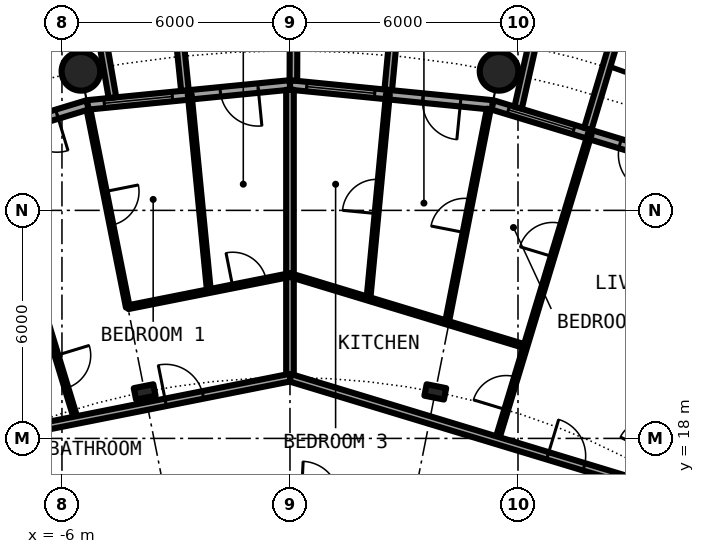
"""IFC4 building model, lengths in metres.
Left out: names, types, materials, properties, quantities, classifications, styles, units other than length and angle.
Written with IfcOpenShell. Run it as: python <this file> out.ifc"""

import sys

from ifc_helpers import new_model, si_unit, direction, frame, frame_2d, origin, origin_2d, place, context, subcontext, project, spatial, rectangle, hollow_circle, i_section, extrude, element, fill, save


model = new_model("IFC4")
c1 = context("Model", 3, precision=1e-05, world=origin(), true_north=direction((0.0, 1.0)))
c2 = subcontext(c1, "Body", "Model", "MODEL_VIEW")
j1 = project(units=[si_unit("LENGTHUNIT", "METRE"), si_unit("PLANEANGLEUNIT", "RADIAN")], contexts=[c1])
p1 = place(None, origin())
s1 = spatial("IfcSite", under=j1, at=p1, CompositionType="ELEMENT")
p2 = place(p1, origin())
s2 = spatial("IfcBuilding", under=s1, at=p2, CompositionType="ELEMENT")
p3 = place(p2, frame((0.0, 0.0, 88.0)))
s3 = spatial("IfcBuildingStorey", under=s2, at=p3, CompositionType="ELEMENT", Elevation=88.0)
for number, where, z_axis, x_axis in (
    (1, (5.501, 27.658, 0.0), (0.0, 0.0, 1.0), (1.0, 0.0, 0.0)),
    (2, (-5.501, 27.658, 0.0), (0.0, 0.0, 1.0), (1.0, 0.0, 0.0)),
):
    element("IfcColumn", number, at=place(p3, frame(where, z_axis=z_axis, x_axis=x_axis)), inside=s3, PredefinedType="COLUMN", context=c2, shape_type="SweptSolid", body=[
        extrude(hollow_circle(Radius=0.508, WallThickness=0.04, at=origin_2d()), origin(), (0.0, 0.0, 1.0), 3.05),
    ])
for number, where, z_axis, x_axis in (
    (3, (3.824, 19.223, 0.0), (0.0, 0.0, 1.0), (0.195, 0.981, 0.0)),
    (4, (-3.824, 19.223, 0.0), (0.0, 0.0, 1.0), (-0.195, 0.981, 0.0)),
):
    element("IfcColumn", number, at=place(p3, frame(where, z_axis=z_axis, x_axis=x_axis)), inside=s3, PredefinedType="COLUMN", context=c2, shape_type="SweptSolid", body=[
        extrude(i_section(OverallWidth=0.306, OverallDepth=0.524, WebThickness=0.021, FlangeThickness=0.04, FilletRadius=0.027, at=origin_2d()), origin(), (0.0, 0.0, 1.0), 3.05),
    ])
p4 = place(p3, frame((10.447, 25.222, 0.0), z_axis=(0.0, 0.0, 1.0), x_axis=(-0.956965678721, 0.290201119486, 0.0)))
e5 = element("IfcWall", 5, at=p4, inside=s3, PredefinedType="SOLIDWALL", context=c2, shape_type="SweptSolid", body=[
    extrude(rectangle(XDim=5.351, YDim=0.25, at=frame_2d((2.676, 0.0))), origin(), (0.0, 0.0, 1.0), 2.7),
])
p5 = place(p4, frame((0.841, 0.0, 0.0)))
e6 = element("IfcOpeningElement", 6, at=p5, cuts=e5, PredefinedType="OPENING", context=c2, shape_type="SweptSolid", body=[
    extrude(rectangle(XDim=1.0, YDim=2.2, at=frame_2d((0.5, 1.1))), frame((0.0, 0.135, 0.0), z_axis=(0.0, -1.0, 0.0), x_axis=(1.0, 0.0, 0.0)), (0.0, 0.0, 1.0), 0.27),
])
p6 = place(p4, frame((3.111, 0.0, 0.3)))
e7 = element("IfcOpeningElement", 7, at=p6, cuts=e5, PredefinedType="OPENING", context=c2, shape_type="SweptSolid", body=[
    extrude(rectangle(XDim=1.8, YDim=2.1, at=frame_2d((0.9, 1.05))), frame((0.0, 0.135, 0.0), z_axis=(0.0, -1.0, 0.0), x_axis=(1.0, 0.0, 0.0)), (0.0, 0.0, 1.0), 0.27),
])
p7 = place(p3, frame((7.837, 26.144, -0.03), z_axis=(0.0, 0.0, 1.0), x_axis=(0.287064767992, 0.957911174889, 0.0)))
e8 = element("IfcWall", 8, at=p7, inside=s3, PredefinedType="SOLIDWALL", context=c2, shape_type="SweptSolid", body=[
    extrude(rectangle(XDim=3.006, YDim=0.2, at=frame_2d((1.503, 0.0))), origin(), (0.0, 0.0, 1.0), 2.73),
])
p8 = place(p3, frame((6.004, 26.7, -0.03), z_axis=(0.0, 0.0, 1.0), x_axis=(0.219609259383, 0.975587911566, 0.0)))
e9 = element("IfcWall", 9, at=p8, inside=s3, PredefinedType="SOLIDWALL", context=c2, shape_type="SweptSolid", body=[
    extrude(rectangle(XDim=2.933, YDim=0.2, at=frame_2d((1.466, 0.0))), origin(), (0.0, 0.0, 1.0), 2.73),
])
p9 = place(p3, frame((5.326, 26.775, 0.0), z_axis=(0.0, 0.0, 1.0), x_axis=(-0.995173996315, 0.098126026407, 0.0)))
e10 = element("IfcWall", 10, at=p9, inside=s3, PredefinedType="SOLIDWALL", context=c2, shape_type="SweptSolid", body=[
    extrude(rectangle(XDim=5.352, YDim=0.25, at=frame_2d((2.676, 0.0))), origin(), (0.0, 0.0, 1.0), 2.7),
])
p10 = place(p9, frame((0.841, 0.0, 0.0)))
e11 = element("IfcOpeningElement", 11, at=p10, cuts=e10, PredefinedType="OPENING", context=c2, shape_type="SweptSolid", body=[
    extrude(rectangle(XDim=1.0, YDim=2.2, at=frame_2d((0.5, 1.1))), frame((0.0, 0.135, 0.0), z_axis=(0.0, -1.0, 0.0), x_axis=(1.0, 0.0, 0.0)), (0.0, 0.0, 1.0), 0.27),
])
p11 = place(p9, frame((3.111, 0.0, 0.3)))
e12 = element("IfcOpeningElement", 12, at=p11, cuts=e10, PredefinedType="OPENING", context=c2, shape_type="SweptSolid", body=[
    extrude(rectangle(XDim=1.8, YDim=2.1, at=frame_2d((0.9, 1.05))), frame((0.0, 0.135, 0.0), z_axis=(0.0, -1.0, 0.0), x_axis=(1.0, 0.0, 0.0)), (0.0, 0.0, 1.0), 0.27),
])
p12 = place(p3, frame((2.586, 27.171, -0.03), z_axis=(0.0, 0.0, 1.0), x_axis=(0.094548432284, 0.995520262954, 0.0)))
e13 = element("IfcWall", 13, at=p12, inside=s3, PredefinedType="SOLIDWALL", context=c2, shape_type="SweptSolid", body=[
    extrude(rectangle(XDim=3.006, YDim=0.2, at=frame_2d((1.503, 0.0))), origin(), (0.0, 0.0, 1.0), 2.73),
])
p13 = place(p3, frame((0.09, 27.417, -0.03), z_axis=(0.0, 0.0, 1.0), x_axis=(0.00347308367, 0.999993968827, 0.0)))
e14 = element("IfcWall", 14, at=p13, inside=s3, PredefinedType="SOLIDWALL", context=c2, shape_type="SweptSolid", body=[
    extrude(rectangle(XDim=2.882, YDim=0.2, at=frame_2d((1.441, 0.0))), origin(), (0.0, 0.0, 1.0), 2.73),
])
p14 = place(p3, frame((0.0, 27.3, 0.0), z_axis=(0.0, 0.0, 1.0), x_axis=(-0.995173996315, -0.098126026407, 0.0)))
e15 = element("IfcWall", 15, at=p14, inside=s3, PredefinedType="SOLIDWALL", context=c2, shape_type="SweptSolid", body=[
    extrude(rectangle(XDim=5.352, YDim=0.25, at=frame_2d((2.676, 0.0))), origin(), (0.0, 0.0, 1.0), 2.7),
])
p15 = place(p14, frame((0.841, 0.0, 0.0)))
e16 = element("IfcOpeningElement", 16, at=p15, cuts=e15, PredefinedType="OPENING", context=c2, shape_type="SweptSolid", body=[
    extrude(rectangle(XDim=1.0, YDim=2.2, at=frame_2d((0.5, 1.1))), frame((0.0, 0.135, 0.0), z_axis=(0.0, -1.0, 0.0), x_axis=(1.0, 0.0, 0.0)), (0.0, 0.0, 1.0), 0.27),
])
p16 = place(p14, frame((3.111, 0.0, 0.3)))
e17 = element("IfcOpeningElement", 17, at=p16, cuts=e15, PredefinedType="OPENING", context=c2, shape_type="SweptSolid", body=[
    extrude(rectangle(XDim=1.8, YDim=2.1, at=frame_2d((0.9, 1.05))), frame((0.0, 0.135, 0.0), z_axis=(0.0, -1.0, 0.0), x_axis=(1.0, 0.0, 0.0)), (0.0, 0.0, 1.0), 0.27),
])
p17 = place(p3, frame((-2.764, 27.153, -0.03), z_axis=(0.0, 0.0, 1.0), x_axis=(-0.101505487237, 0.994834979311, 0.0)))
e18 = element("IfcWall", 18, at=p17, inside=s3, PredefinedType="SOLIDWALL", context=c2, shape_type="SweptSolid", body=[
    extrude(rectangle(XDim=3.007, YDim=0.2, at=frame_2d((1.503, 0.0))), origin(), (0.0, 0.0, 1.0), 2.73),
])
p18 = place(p3, frame((-4.671, 26.966, -0.03), z_axis=(0.0, 0.0, 1.0), x_axis=(-0.170539878907, 0.985350774954, 0.0)))
e19 = element("IfcWall", 19, at=p18, inside=s3, PredefinedType="SOLIDWALL", context=c2, shape_type="SweptSolid", body=[
    extrude(rectangle(XDim=2.932, YDim=0.2, at=frame_2d((1.466, 0.0))), origin(), (0.0, 0.0, 1.0), 2.73),
])
p19 = place(p3, frame((-5.326, 26.775, 0.0), z_axis=(0.0, 0.0, 1.0), x_axis=(-0.956965678721, -0.290201119486, 0.0)))
e20 = element("IfcWall", 20, at=p19, inside=s3, PredefinedType="SOLIDWALL", context=c2, shape_type="SweptSolid", body=[
    extrude(rectangle(XDim=5.351, YDim=0.25, at=frame_2d((2.676, 0.0))), origin(), (0.0, 0.0, 1.0), 2.7),
])
p20 = place(p19, frame((0.841, 0.0, 0.0)))
e21 = element("IfcOpeningElement", 21, at=p20, cuts=e20, PredefinedType="OPENING", context=c2, shape_type="SweptSolid", body=[
    extrude(rectangle(XDim=1.0, YDim=2.2, at=frame_2d((0.5, 1.1))), frame((0.0, 0.135, 0.0), z_axis=(0.0, -1.0, 0.0), x_axis=(1.0, 0.0, 0.0)), (0.0, 0.0, 1.0), 0.27),
])
p21 = place(p19, frame((3.111, 0.0, 0.3)))
e22 = element("IfcOpeningElement", 22, at=p21, cuts=e20, PredefinedType="OPENING", context=c2, shape_type="SweptSolid", body=[
    extrude(rectangle(XDim=1.8, YDim=2.1, at=frame_2d((0.9, 1.05))), frame((0.0, 0.135, 0.0), z_axis=(0.0, -1.0, 0.0), x_axis=(1.0, 0.0, 0.0)), (0.0, 0.0, 1.0), 0.27),
])
p22 = place(p3, frame((-6.4, 21.027, 0.0), z_axis=(0.0, 0.0, 1.0), x_axis=(0.291157965538, -0.956674991365, 0.0)))
e23 = element("IfcWall", 23, at=p22, inside=s3, PredefinedType="PARTITIONING", context=c2, shape_type="SweptSolid", body=[
    extrude(rectangle(XDim=2.661, YDim=0.1, at=frame_2d((1.331, 0.0))), origin(), (0.0, 0.0, 1.0), 2.7),
])
p23 = place(p22, frame((0.881, 0.0, 0.0)))
e24 = element("IfcOpeningElement", 24, at=p23, cuts=e23, PredefinedType="OPENING", context=c2, shape_type="SweptSolid", body=[
    extrude(rectangle(XDim=0.9, YDim=2.3, at=frame_2d((0.45, 1.15))), frame((0.0, 0.06, 0.0), z_axis=(0.0, -1.0, 0.0), x_axis=(1.0, 0.0, 0.0)), (0.0, 0.0, 1.0), 0.12),
])
p24 = place(p3, frame((-5.302, 26.653, 0.0), z_axis=(0.0, 0.0, 1.0), x_axis=(0.195115793364, -0.980780213493, 0.0)))
e25 = element("IfcWall", 25, at=p24, inside=s3, PredefinedType="PARTITIONING", context=c2, shape_type="SweptSolid", body=[
    extrude(rectangle(XDim=5.304, YDim=0.1, at=frame_2d((2.652, 0.0))), origin(), (0.0, 0.0, 1.0), 2.7),
])
p25 = place(p24, frame((2.202, 0.0, 0.0)))
e26 = element("IfcOpeningElement", 26, at=p25, cuts=e25, PredefinedType="OPENING", context=c2, shape_type="SweptSolid", body=[
    extrude(rectangle(XDim=0.9, YDim=2.3, at=frame_2d((0.45, 1.15))), frame((0.0, 0.06, 0.0), z_axis=(0.0, -1.0, 0.0), x_axis=(1.0, 0.0, 0.0)), (0.0, 0.0, 1.0), 0.12),
])
p26 = place(p3, frame((-2.638, 27.047, 0.0), z_axis=(0.0, 0.0, 1.0), x_axis=(0.097172620677, -0.99526754282, 0.0)))
e27 = element("IfcWall", 27, at=p26, inside=s3, PredefinedType="PARTITIONING", context=c2, shape_type="SweptSolid", body=[
    extrude(rectangle(XDim=5.196, YDim=0.1, at=frame_2d((2.598, 0.0))), origin(), (0.0, 0.0, 1.0), 2.7),
])
p27 = place(p3, frame((0.0, 19.6, 0.0), z_axis=(0.0, 0.0, 1.0), x_axis=(0.0, 1.0, 0.0)))
e28 = element("IfcWall", 28, at=p27, inside=s3, PredefinedType="PARTITIONING", context=c2, shape_type="SweptSolid", body=[
    extrude(rectangle(XDim=7.575, YDim=0.2, at=frame_2d((3.788, 0.0))), origin(), (0.0, 0.0, 1.0), 2.7),
])
p28 = place(p3, frame((2.065, 21.674, 0.0), z_axis=(0.0, 0.0, 1.0), x_axis=(0.094751520537, 0.99550095397, 0.0)))
e29 = element("IfcWall", 29, at=p28, inside=s3, PredefinedType="PARTITIONING", context=c2, shape_type="SweptSolid", body=[
    extrude(rectangle(XDim=5.403, YDim=0.1, at=frame_2d((2.702, 0.0))), origin(), (0.0, 0.0, 1.0), 2.7),
])
p29 = place(p28, frame((2.252, 0.0, 0.0)))
e30 = element("IfcOpeningElement", 30, at=p29, cuts=e29, PredefinedType="OPENING", context=c2, shape_type="SweptSolid", body=[
    extrude(rectangle(XDim=0.9, YDim=2.3, at=frame_2d((0.45, 1.15))), frame((0.0, 0.06, 0.0), z_axis=(0.0, -1.0, 0.0), x_axis=(1.0, 0.0, 0.0)), (0.0, 0.0, 1.0), 0.12),
])
p30 = place(p3, frame((4.13, 21.047, 0.0), z_axis=(0.0, 0.0, 1.0), x_axis=(0.192433779325, 0.981309961518, 0.0)))
e31 = element("IfcWall", 31, at=p30, inside=s3, PredefinedType="PARTITIONING", context=c2, shape_type="SweptSolid", body=[
    extrude(rectangle(XDim=5.727, YDim=0.1, at=frame_2d((2.863, 0.0))), origin(), (0.0, 0.0, 1.0), 2.7),
])
p31 = place(p30, frame((2.414, 0.0, 0.0)))
e32 = element("IfcOpeningElement", 32, at=p31, cuts=e31, PredefinedType="OPENING", context=c2, shape_type="SweptSolid", body=[
    extrude(rectangle(XDim=0.9, YDim=2.3, at=frame_2d((0.45, 1.15))), frame((0.0, 0.06, 0.0), z_axis=(0.0, -1.0, 0.0), x_axis=(1.0, 0.0, 0.0)), (0.0, 0.0, 1.0), 0.12),
])
p32 = place(p3, frame((5.445, 17.948, 0.0), z_axis=(0.0, 0.0, 1.0), x_axis=(0.290158700753, 0.956978541231, 0.0)))
e33 = element("IfcWall", 33, at=p32, inside=s3, PredefinedType="PARTITIONING", context=c2, shape_type="SweptSolid", body=[
    extrude(rectangle(XDim=8.419, YDim=0.1, at=frame_2d((4.209, 0.0))), origin(), (0.0, 0.0, 1.0), 2.7),
])
p33 = place(p32, frame((0.842, 0.0, 0.0)))
e34 = element("IfcOpeningElement", 34, at=p33, cuts=e33, PredefinedType="OPENING", context=c2, shape_type="SweptSolid", body=[
    extrude(rectangle(XDim=0.9, YDim=2.3, at=frame_2d((0.45, 1.15))), frame((0.0, 0.06, 0.0), z_axis=(0.0, -1.0, 0.0), x_axis=(1.0, 0.0, 0.0)), (0.0, 0.0, 1.0), 0.12),
])
p34 = place(p32, frame((5.052, 0.0, 0.0)))
e35 = element("IfcOpeningElement", 35, at=p34, cuts=e33, PredefinedType="OPENING", context=c2, shape_type="SweptSolid", body=[
    extrude(rectangle(XDim=0.9, YDim=2.3, at=frame_2d((0.45, 1.15))), frame((0.0, 0.06, 0.0), z_axis=(0.0, -1.0, 0.0), x_axis=(1.0, 0.0, 0.0)), (0.0, 0.0, 1.0), 0.12),
])
p35 = place(p3, frame((-0.007, 19.599, 0.0), z_axis=(0.0, 0.0, 1.0), x_axis=(0.95700958731, -0.290056287291, 0.0)))
e36 = element("IfcWall", 36, at=p35, inside=s3, PredefinedType="PARTITIONING", context=c2, shape_type="SweptSolid", body=[
    extrude(rectangle(XDim=11.226, YDim=0.2, at=frame_2d((5.613, 0.0))), origin(), (0.0, 0.0, 1.0), 2.38),
])
p36 = place(p35, frame((7.093, 0.0, 0.0)))
e37 = element("IfcOpeningElement", 37, at=p36, cuts=e36, PredefinedType="OPENING", context=c2, shape_type="SweptSolid", body=[
    extrude(rectangle(XDim=1.0, YDim=2.3, at=frame_2d((0.5, 1.15))), frame((0.0, 0.11, 0.0), z_axis=(0.0, -1.0, 0.0), x_axis=(1.0, 0.0, 0.0)), (0.0, 0.0, 1.0), 0.22),
])
p37 = place(p3, frame((-7.501, 18.108, 0.0), z_axis=(0.0, 0.0, 1.0), x_axis=(0.980791233058, 0.195060393611, 0.0)))
e38 = element("IfcWall", 38, at=p37, inside=s3, PredefinedType="PARTITIONING", context=c2, shape_type="SweptSolid", body=[
    extrude(rectangle(XDim=7.65, YDim=0.2, at=frame_2d((3.825, 0.0))), origin(), (0.0, 0.0, 1.0), 2.38),
])
p38 = place(p37, frame((4.313, 0.0, 0.0)))
e39 = element("IfcOpeningElement", 39, at=p38, cuts=e38, PredefinedType="OPENING", context=c2, shape_type="SweptSolid", body=[
    extrude(rectangle(XDim=1.0, YDim=2.3, at=frame_2d((0.5, 1.15))), frame((0.0, 0.11, 0.0), z_axis=(0.0, -1.0, 0.0), x_axis=(1.0, 0.0, 0.0)), (0.0, 0.0, 1.0), 0.22),
])
p39 = place(p3, frame((-0.004, 22.299, 0.0), z_axis=(0.0, 0.0, 1.0), x_axis=(0.95699555343, -0.290102586537, 0.0)))
e40 = element("IfcWall", 40, at=p39, inside=s3, PredefinedType="PARTITIONING", context=c2, shape_type="SweptSolid", body=[
    extrude(rectangle(XDim=6.478, YDim=0.1, at=frame_2d((3.239, 0.0))), origin(), (0.0, 0.0, 1.0), 2.7),
])
p40 = place(p3, frame((-4.261, 21.452, 0.0), z_axis=(0.0, 0.0, 1.0), x_axis=(0.980819753929, 0.194916931799, 0.0)))
e41 = element("IfcWall", 41, at=p40, inside=s3, PredefinedType="PARTITIONING", context=c2, shape_type="SweptSolid", body=[
    extrude(rectangle(XDim=4.346, YDim=0.1, at=frame_2d((2.173, 0.0))), origin(), (0.0, 0.0, 1.0), 2.7),
])
p41 = place(p40, frame((2.807, 0.0, 0.0)))
e42 = element("IfcOpeningElement", 42, at=p41, cuts=e41, PredefinedType="OPENING", context=c2, shape_type="SweptSolid", body=[
    extrude(rectangle(XDim=0.9, YDim=2.3, at=frame_2d((0.45, 1.15))), frame((0.0, 0.06, 0.0), z_axis=(0.0, -1.0, 0.0), x_axis=(1.0, 0.0, 0.0)), (0.0, 0.0, 1.0), 0.12),
])
p42 = place(p5, origin())
e43 = element("IfcDoor", 43, at=p42, inside=s3, OperationType="SINGLE_SWING_LEFT", PredefinedType="DOOR", context=c2, shape_type="SweptSolid", body=[
    extrude(rectangle(XDim=1.0, YDim=2.2, at=frame_2d((0.5, 1.1))), frame((0.0, 0.025, 0.0), z_axis=(0.0, -1.0, 0.0), x_axis=(1.0, 0.0, 0.0)), (0.0, 0.0, 1.0), 0.05),
])
fill(e6, e43)
p43 = place(p6, origin())
e44 = element("IfcWindow", 44, at=p43, inside=s3, PartitioningType="SINGLE_PANEL", PredefinedType="WINDOW", context=c2, shape_type="SweptSolid", body=[
    extrude(rectangle(XDim=1.8, YDim=2.1, at=frame_2d((0.9, 1.05))), frame((0.0, 0.03, 0.0), z_axis=(0.0, -1.0, 0.0), x_axis=(1.0, 0.0, 0.0)), (0.0, 0.0, 1.0), 0.06),
])
fill(e7, e44)
p44 = place(p10, origin())
e45 = element("IfcDoor", 45, at=p44, inside=s3, OperationType="SINGLE_SWING_LEFT", PredefinedType="DOOR", context=c2, shape_type="SweptSolid", body=[
    extrude(rectangle(XDim=1.0, YDim=2.2, at=frame_2d((0.5, 1.1))), frame((0.0, 0.025, 0.0), z_axis=(0.0, -1.0, 0.0), x_axis=(1.0, 0.0, 0.0)), (0.0, 0.0, 1.0), 0.05),
])
fill(e11, e45)
p45 = place(p11, origin())
e46 = element("IfcWindow", 46, at=p45, inside=s3, PartitioningType="SINGLE_PANEL", PredefinedType="WINDOW", context=c2, shape_type="SweptSolid", body=[
    extrude(rectangle(XDim=1.8, YDim=2.1, at=frame_2d((0.9, 1.05))), frame((0.0, 0.03, 0.0), z_axis=(0.0, -1.0, 0.0), x_axis=(1.0, 0.0, 0.0)), (0.0, 0.0, 1.0), 0.06),
])
fill(e12, e46)
p46 = place(p15, origin())
e47 = element("IfcDoor", 47, at=p46, inside=s3, OperationType="SINGLE_SWING_LEFT", PredefinedType="DOOR", context=c2, shape_type="SweptSolid", body=[
    extrude(rectangle(XDim=1.0, YDim=2.2, at=frame_2d((0.5, 1.1))), frame((0.0, 0.025, 0.0), z_axis=(0.0, -1.0, 0.0), x_axis=(1.0, 0.0, 0.0)), (0.0, 0.0, 1.0), 0.05),
])
fill(e16, e47)
p47 = place(p16, origin())
e48 = element("IfcWindow", 48, at=p47, inside=s3, PartitioningType="SINGLE_PANEL", PredefinedType="WINDOW", context=c2, shape_type="SweptSolid", body=[
    extrude(rectangle(XDim=1.8, YDim=2.1, at=frame_2d((0.9, 1.05))), frame((0.0, 0.03, 0.0), z_axis=(0.0, -1.0, 0.0), x_axis=(1.0, 0.0, 0.0)), (0.0, 0.0, 1.0), 0.06),
])
fill(e17, e48)
p48 = place(p20, origin())
e49 = element("IfcDoor", 49, at=p48, inside=s3, OperationType="SINGLE_SWING_LEFT", PredefinedType="DOOR", context=c2, shape_type="SweptSolid", body=[
    extrude(rectangle(XDim=1.0, YDim=2.2, at=frame_2d((0.5, 1.1))), frame((0.0, 0.025, 0.0), z_axis=(0.0, -1.0, 0.0), x_axis=(1.0, 0.0, 0.0)), (0.0, 0.0, 1.0), 0.05),
])
fill(e21, e49)
p49 = place(p36, origin())
e50 = element("IfcDoor", 50, at=p49, inside=s3, OperationType="SINGLE_SWING_RIGHT", PredefinedType="DOOR", context=c2, shape_type="SweptSolid", body=[
    extrude(rectangle(XDim=1.0, YDim=2.3, at=frame_2d((0.5, 1.15))), frame((0.0, 0.025, 0.0), z_axis=(0.0, -1.0, 0.0), x_axis=(1.0, 0.0, 0.0)), (0.0, 0.0, 1.0), 0.05),
])
fill(e37, e50)
p50 = place(p33, origin())
e51 = element("IfcDoor", 51, at=p50, inside=s3, OperationType="SINGLE_SWING_LEFT", PredefinedType="DOOR", context=c2, shape_type="SweptSolid", body=[
    extrude(rectangle(XDim=0.9, YDim=2.3, at=frame_2d((0.45, 1.15))), frame((0.0, 0.025, 0.0), z_axis=(0.0, -1.0, 0.0), x_axis=(1.0, 0.0, 0.0)), (0.0, 0.0, 1.0), 0.05),
])
fill(e34, e51)
p51 = place(p34, origin())
e52 = element("IfcDoor", 52, at=p51, inside=s3, OperationType="SINGLE_SWING_RIGHT", PredefinedType="DOOR", context=c2, shape_type="SweptSolid", body=[
    extrude(rectangle(XDim=0.9, YDim=2.3, at=frame_2d((0.45, 1.15))), frame((0.0, 0.025, 0.0), z_axis=(0.0, -1.0, 0.0), x_axis=(1.0, 0.0, 0.0)), (0.0, 0.0, 1.0), 0.05),
])
fill(e35, e52)
p52 = place(p31, origin())
e53 = element("IfcDoor", 53, at=p52, inside=s3, OperationType="SINGLE_SWING_RIGHT", PredefinedType="DOOR", context=c2, shape_type="SweptSolid", body=[
    extrude(rectangle(XDim=0.9, YDim=2.3, at=frame_2d((0.45, 1.15))), frame((0.0, 0.025, 0.0), z_axis=(0.0, -1.0, 0.0), x_axis=(1.0, 0.0, 0.0)), (0.0, 0.0, 1.0), 0.05),
])
fill(e32, e53)
p53 = place(p29, origin())
e54 = element("IfcDoor", 54, at=p53, inside=s3, OperationType="SINGLE_SWING_LEFT", PredefinedType="DOOR", context=c2, shape_type="SweptSolid", body=[
    extrude(rectangle(XDim=0.9, YDim=2.3, at=frame_2d((0.45, 1.15))), frame((0.0, 0.025, 0.0), z_axis=(0.0, -1.0, 0.0), x_axis=(1.0, 0.0, 0.0)), (0.0, 0.0, 1.0), 0.05),
])
fill(e30, e54)
p54 = place(p38, origin())
e55 = element("IfcDoor", 55, at=p54, inside=s3, OperationType="SINGLE_SWING_RIGHT", PredefinedType="DOOR", context=c2, shape_type="SweptSolid", body=[
    extrude(rectangle(XDim=1.0, YDim=2.3, at=frame_2d((0.5, 1.15))), frame((0.0, 0.025, 0.0), z_axis=(0.0, -1.0, 0.0), x_axis=(1.0, 0.0, 0.0)), (0.0, 0.0, 1.0), 0.05),
])
fill(e39, e55)
p55 = place(p23, origin())
e56 = element("IfcDoor", 56, at=p55, inside=s3, OperationType="SINGLE_SWING_RIGHT", PredefinedType="DOOR", context=c2, shape_type="SweptSolid", body=[
    extrude(rectangle(XDim=0.9, YDim=2.3, at=frame_2d((0.45, 1.15))), frame((0.0, 0.025, 0.0), z_axis=(0.0, -1.0, 0.0), x_axis=(1.0, 0.0, 0.0)), (0.0, 0.0, 1.0), 0.05),
])
fill(e24, e56)
p56 = place(p25, origin())
e57 = element("IfcDoor", 57, at=p56, inside=s3, OperationType="SINGLE_SWING_LEFT", PredefinedType="DOOR", context=c2, shape_type="SweptSolid", body=[
    extrude(rectangle(XDim=0.9, YDim=2.3, at=frame_2d((0.45, 1.15))), frame((0.0, 0.025, 0.0), z_axis=(0.0, -1.0, 0.0), x_axis=(1.0, 0.0, 0.0)), (0.0, 0.0, 1.0), 0.05),
])
fill(e26, e57)
p57 = place(p41, origin())
e58 = element("IfcDoor", 58, at=p57, inside=s3, OperationType="SINGLE_SWING_RIGHT", PredefinedType="DOOR", context=c2, shape_type="SweptSolid", body=[
    extrude(rectangle(XDim=0.9, YDim=2.3, at=frame_2d((0.45, 1.15))), frame((0.0, 0.025, 0.0), z_axis=(0.0, -1.0, 0.0), x_axis=(1.0, 0.0, 0.0)), (0.0, 0.0, 1.0), 0.05),
])
fill(e42, e58)
save(model, sys.argv[1])
